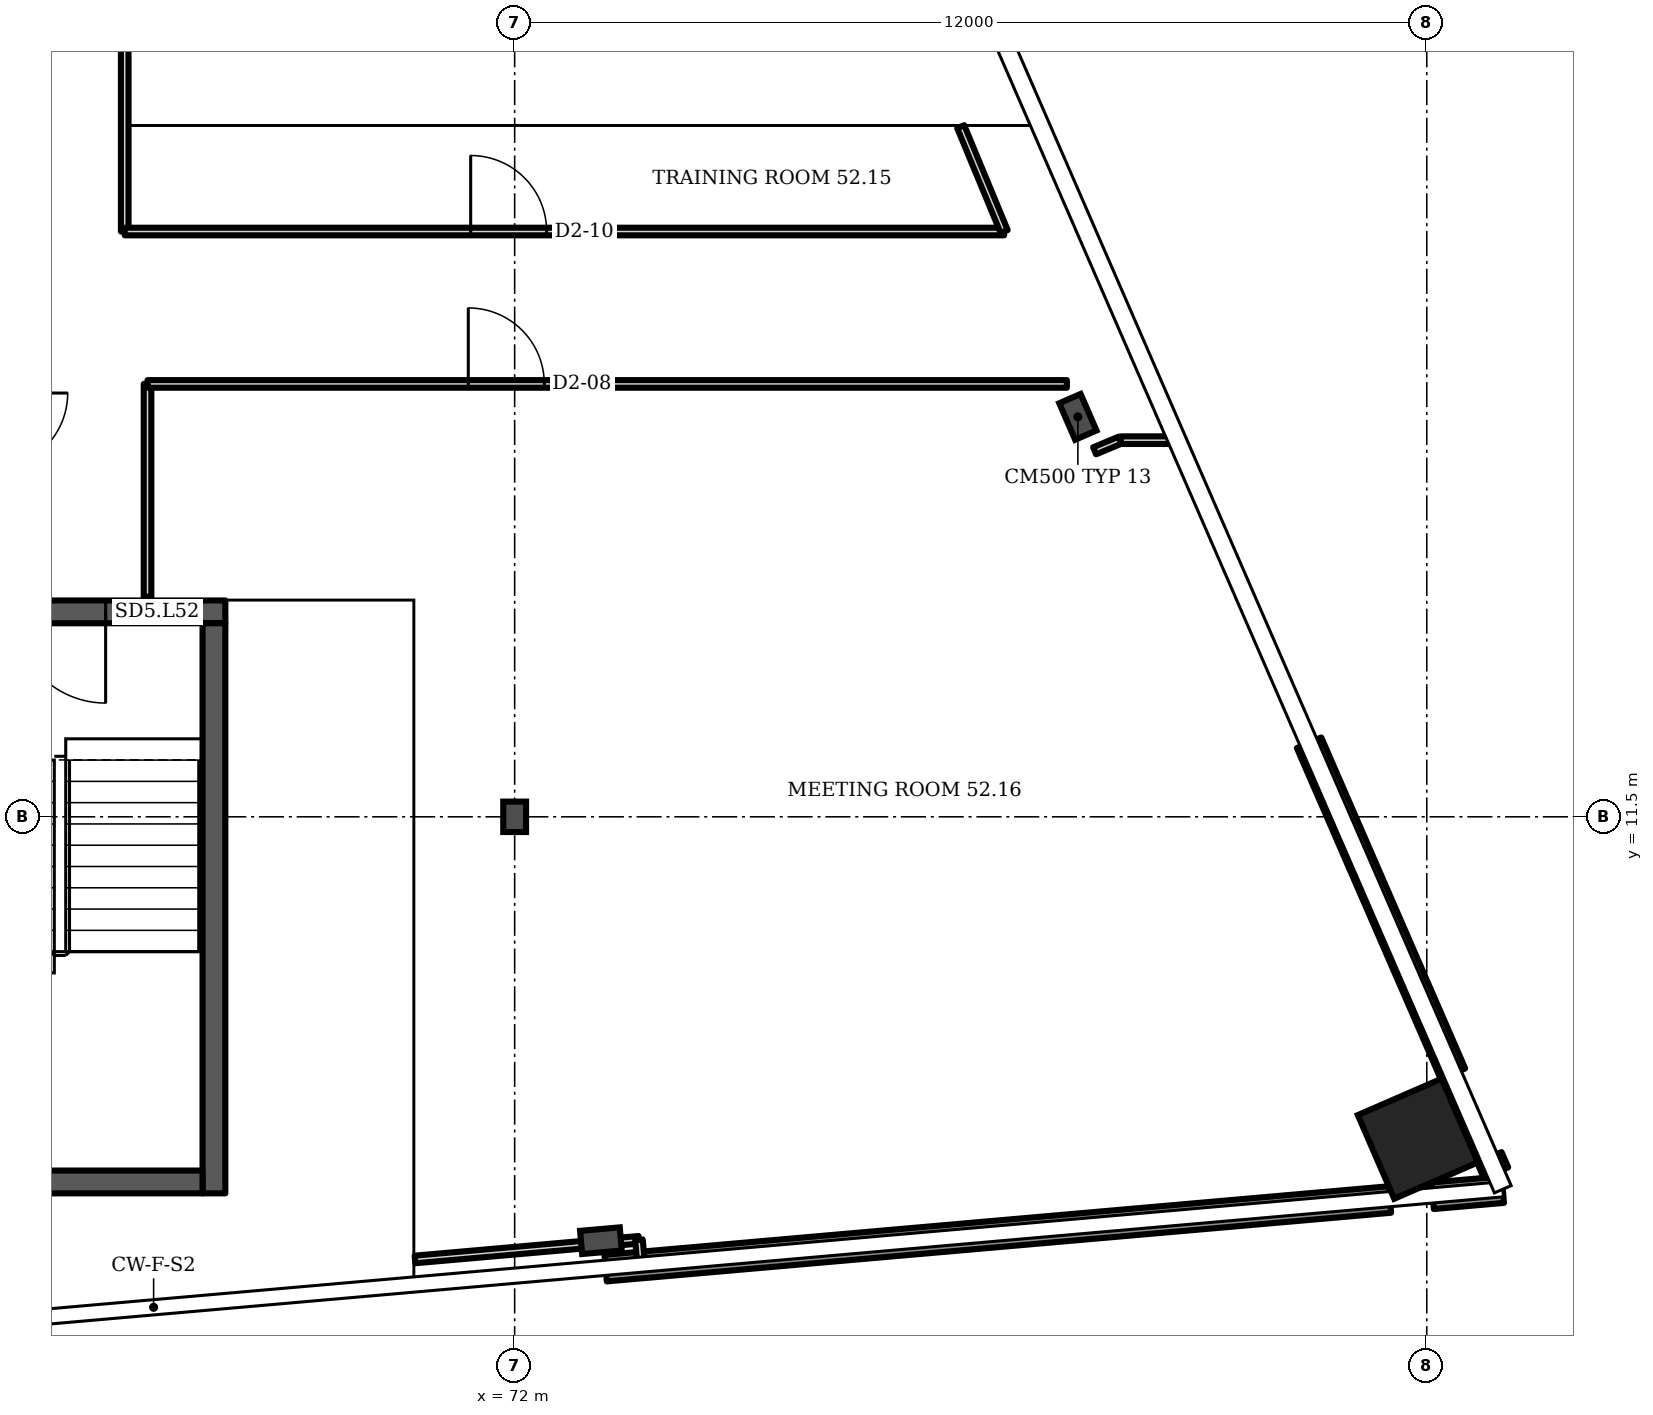
"""IFC4 building model, lengths in metres.
Left out: names, types, materials, properties, quantities, classifications, styles, units other than length and angle.
Written with IfcOpenShell. Run it as: python <this file> out.ifc"""

import sys

from ifc_helpers import new_model, si_unit, direction, frame, frame_2d, origin, origin_2d, place, context, subcontext, project, spatial, rectangle, i_section, extrude, element, fill, save


model = new_model("IFC4")
c1 = context("Model", 3, precision=1e-05, world=origin(), true_north=direction((0.0, 1.0)))
c2 = subcontext(c1, "Body", "Model", "MODEL_VIEW")
j1 = project(units=[si_unit("LENGTHUNIT", "METRE"), si_unit("PLANEANGLEUNIT", "RADIAN")], contexts=[c1])
p1 = place(None, origin())
s1 = spatial("IfcSite", under=j1, at=p1, CompositionType="ELEMENT")
p2 = place(p1, origin())
s2 = spatial("IfcBuilding", under=s1, at=p2, CompositionType="ELEMENT")
p3 = place(p2, frame((0.0, 0.0, 210.7)))
s3 = spatial("IfcBuildingStorey", under=s2, at=p3, CompositionType="ELEMENT", Elevation=210.7)
p4 = place(p3, frame((83.883, 7.265, 0.0), z_axis=(0.0, 0.0, 1.0), x_axis=(-0.398727, 0.917072, 0.0)))
e1 = element("IfcColumn", 1, at=p4, inside=s3, PredefinedType="COLUMN", context=c2, shape_type="SweptSolid", body=[
    extrude(rectangle(XDim=1.2, YDim=1.2, at=origin_2d()), origin(), (0.0, 0.0, 1.0), 3.6),
])
for number, where, z_axis, x_axis in (
    (2, (73.135, 5.923, 0.0), (0.0, 0.0, 1.0), (0.087, -0.996, 0.0)),
    (3, (79.41, 16.762, 0.0), (0.0, 0.0, 1.0), (0.917, 0.399, 0.0)),
):
    element("IfcColumn", number, at=place(p3, frame(where, z_axis=z_axis, x_axis=x_axis)), inside=s3, PredefinedType="COLUMN", context=c2, shape_type="SweptSolid", body=[
        extrude(i_section(OverallWidth=0.306, OverallDepth=0.524, WebThickness=0.021, FlangeThickness=0.04, FilletRadius=0.027, at=origin_2d()), origin(), (0.0, 0.0, 1.0), 3.6),
    ])
p5 = place(p3, frame((72.0, 11.5, 0.0), z_axis=(0.0, 0.0, 1.0), x_axis=(1.0, 0.0, 0.0)))
e4 = element("IfcColumn", 4, at=p5, inside=s3, PredefinedType="COLUMN", context=c2, shape_type="SweptSolid", body=[
    extrude(i_section(OverallWidth=0.3, OverallDepth=0.4, WebThickness=0.013, FlangeThickness=0.024, FilletRadius=0.027, at=origin_2d()), origin(), (0.0, 0.0, 1.0), 3.6),
])
p6 = place(p3, frame((73.197, 5.562, 0.0), z_axis=(0.0, 0.0, 1.0), x_axis=(0.996198, 0.087163, 0.0)))
e5 = element("IfcWall", 5, at=p6, inside=s3, PredefinedType="SOLIDWALL", context=c2, shape_type="SweptSolid", body=[
    extrude(rectangle(XDim=10.358, YDim=0.35, at=frame_2d((5.179, 0.0))), origin(), (0.0, 0.0, 1.0), 1.0),
])
p7 = place(p3, frame((84.078, 6.514, 0.0), z_axis=(0.0, 0.0, 1.0), x_axis=(0.996213, 0.086971, 0.0)))
e6 = element("IfcWall", 6, at=p7, inside=s3, PredefinedType="SOLIDWALL", context=c2, shape_type="SweptSolid", body=[
    extrude(rectangle(XDim=0.926, YDim=0.35, at=frame_2d((0.463, 0.0))), origin(), (0.0, 0.0, 1.0), 1.0),
])
p8 = place(p3, frame((84.91, 6.819, 0.0), z_axis=(0.0, 0.0, 1.0), x_axis=(-0.398359, 0.91723, 0.0)))
e7 = element("IfcWall", 7, at=p8, inside=s3, PredefinedType="SOLIDWALL", context=c2, shape_type="SweptSolid", body=[
    extrude(rectangle(XDim=0.219, YDim=0.35, at=frame_2d((0.109, 0.0))), origin(), (0.0, 0.0, 1.0), 1.0),
])
p9 = place(p3, frame((84.345, 8.12, 0.0), z_axis=(0.0, 0.0, 1.0), x_axis=(-0.398736, 0.917067, 0.0)))
e8 = element("IfcWall", 8, at=p9, inside=s3, PredefinedType="SOLIDWALL", context=c2, shape_type="SweptSolid", body=[
    extrude(rectangle(XDim=4.748, YDim=0.35, at=frame_2d((2.374, 0.0))), origin(), (0.0, 0.0, 1.0), 1.0),
])
p10 = place(p3, frame((63.844, 14.196, 0.0), z_axis=(0.0, 0.0, 1.0), x_axis=(1.0, 0.0, 0.0)))
e9 = element("IfcWall", 9, at=p10, inside=s3, PredefinedType="SHEAR", context=c2, shape_type="SweptSolid", body=[
    extrude(rectangle(XDim=4.35, YDim=0.3, at=frame_2d((2.175, 0.0))), origin(), (0.0, 0.0, 1.0), 3.2),
])
p11 = place(p10, frame((1.575, 0.0, 0.0)))
e10 = element("IfcOpeningElement", 10, at=p11, cuts=e9, PredefinedType="OPENING", context=c2, shape_type="SweptSolid", body=[
    extrude(rectangle(XDim=1.2, YDim=2.1, at=frame_2d((0.6, 1.05))), frame((0.0, 0.16, 0.0), z_axis=(0.0, -1.0, 0.0), x_axis=(1.0, 0.0, 0.0)), (0.0, 0.0, 1.0), 0.32),
])
p12 = place(p3, frame((66.87, 19.2, 0.0), z_axis=(0.0, 0.0, 1.0), x_axis=(0.0, 1.0, 0.0)))
e11 = element("IfcWall", 11, at=p12, inside=s3, PredefinedType="PARTITIONING", context=c2, shape_type="SweptSolid", body=[
    extrude(rectangle(XDim=2.575, YDim=0.1, at=frame_2d((1.288, 0.0))), origin(), (0.0, 0.0, 1.0), 3.2),
])
p13 = place(p3, frame((66.87, 19.2, 0.0), z_axis=(0.0, 0.0, 1.0), x_axis=(1.0, 0.0, 0.0)))
e12 = element("IfcWall", 12, at=p13, inside=s3, PredefinedType="PARTITIONING", context=c2, shape_type="SweptSolid", body=[
    extrude(rectangle(XDim=11.57, YDim=0.1, at=frame_2d((5.785, 0.0))), origin(), (0.0, 0.0, 1.0), 3.2),
])
p14 = place(p13, frame((4.551, 0.0, 0.0)))
e13 = element("IfcOpeningElement", 13, at=p14, cuts=e12, PredefinedType="OPENING", context=c2, shape_type="SweptSolid", body=[
    extrude(rectangle(XDim=1.0, YDim=2.1, at=frame_2d((0.5, 1.05))), frame((0.0, 0.06, 0.0), z_axis=(0.0, -1.0, 0.0), x_axis=(1.0, 0.0, 0.0)), (0.0, 0.0, 1.0), 0.12),
])
p15 = place(p3, frame((67.17, 14.395, 0.0), z_axis=(0.0, 0.0, 1.0), x_axis=(0.0, 1.0, 0.0)))
e14 = element("IfcWall", 14, at=p15, inside=s3, PredefinedType="PARTITIONING", context=c2, shape_type="SweptSolid", body=[
    extrude(rectangle(XDim=2.8, YDim=0.1, at=frame_2d((1.4, 0.0))), origin(), (0.0, 0.0, 1.0), 3.2),
])
p16 = place(p3, frame((67.17, 17.195, 0.0), z_axis=(0.0, 0.0, 1.0), x_axis=(1.0, 0.0, 0.0)))
e15 = element("IfcWall", 15, at=p16, inside=s3, PredefinedType="PARTITIONING", context=c2, shape_type="SweptSolid", body=[
    extrude(rectangle(XDim=12.095, YDim=0.1, at=frame_2d((6.047, 0.0))), origin(), (0.0, 0.0, 1.0), 3.2),
])
p17 = place(p16, frame((4.22, 0.0, 0.0)))
e16 = element("IfcOpeningElement", 16, at=p17, cuts=e15, PredefinedType="OPENING", context=c2, shape_type="SweptSolid", body=[
    extrude(rectangle(XDim=1.0, YDim=2.1, at=frame_2d((0.5, 1.05))), frame((0.0, 0.06, 0.0), z_axis=(0.0, -1.0, 0.0), x_axis=(1.0, 0.0, 0.0)), (0.0, 0.0, 1.0), 0.12),
])
p18 = place(p3, frame((70.689, 5.677, 0.0), z_axis=(0.0, 0.0, 1.0), x_axis=(0.996174, 0.087417, 0.0)))
e17 = element("IfcWall", 17, at=p18, inside=s3, PredefinedType="PARTITIONING", context=c2, shape_type="SweptSolid", body=[
    extrude(rectangle(XDim=2.958, YDim=0.1, at=frame_2d((1.479, 0.0))), origin(), (0.0, 0.0, 1.0), 2.58),
])
p19 = place(p3, frame((73.663, 5.628, 0.0), z_axis=(0.0, 0.0, 1.0), x_axis=(-0.091893, 0.995772, 0.0)))
e18 = element("IfcWall", 18, at=p19, inside=s3, PredefinedType="PARTITIONING", context=c2, shape_type="SweptSolid", body=[
    extrude(rectangle(XDim=0.308, YDim=0.1, at=frame_2d((0.154, 0.0))), origin(), (0.0, 0.0, 1.0), 3.2),
])
p20 = place(p3, frame((78.44, 19.2, 0.0), z_axis=(0.0, 0.0, 1.0), x_axis=(-0.382605, 0.923907, 0.0)))
e19 = element("IfcWall", 19, at=p20, inside=s3, PredefinedType="PARTITIONING", context=c2, shape_type="SweptSolid", body=[
    extrude(rectangle(XDim=1.494, YDim=0.1, at=frame_2d((0.747, 0.0))), origin(), (0.0, 0.0, 1.0), 3.2),
])
p21 = place(p3, frame((79.63, 16.315, 0.0), z_axis=(0.0, 0.0, 1.0), x_axis=(0.92262, 0.385713, 0.0)))
e20 = element("IfcWall", 20, at=p21, inside=s3, PredefinedType="PARTITIONING", context=c2, shape_type="SweptSolid", body=[
    extrude(rectangle(XDim=0.363, YDim=0.1, at=frame_2d((0.182, 0.0))), origin(), (0.0, 0.0, 1.0), 3.2),
])
p22 = place(p3, frame((79.975, 16.455, 0.0), z_axis=(0.0, 0.0, 1.0), x_axis=(1.0, 0.0, 0.0)))
e21 = element("IfcWall", 21, at=p22, inside=s3, PredefinedType="PARTITIONING", context=c2, shape_type="SweptSolid", body=[
    extrude(rectangle(XDim=0.718, YDim=0.1, at=frame_2d((0.359, 0.0))), origin(), (0.0, 0.0, 1.0), 3.2),
])
p23 = place(p3, frame((68.044, 6.546, 0.0), z_axis=(0.0, 0.0, 1.0), x_axis=(0.0, 1.0, 0.0)))
e22 = element("IfcWall", 22, at=p23, inside=s3, PredefinedType="SHEAR", context=c2, shape_type="SweptSolid", body=[
    extrude(rectangle(XDim=7.5, YDim=0.3, at=frame_2d((3.75, 0.0))), origin(), (0.0, 0.0, 1.0), 3.2),
])
p24 = place(p3, frame((64.144, 6.696, 0.0), z_axis=(0.0, 0.0, 1.0), x_axis=(1.0, 0.0, 0.0)))
e23 = element("IfcWall", 23, at=p24, inside=s3, PredefinedType="SHEAR", context=c2, shape_type="SweptSolid", body=[
    extrude(rectangle(XDim=3.75, YDim=0.3, at=frame_2d((1.875, 0.0))), origin(), (0.0, 0.0, 1.0), 3.2),
])
p25 = place(p11, origin())
e24 = element("IfcDoor", 24, at=p25, inside=s3, OperationType="SINGLE_SWING_RIGHT", PredefinedType="DOOR", context=c2, shape_type="SweptSolid", body=[
    extrude(rectangle(XDim=1.2, YDim=2.1, at=frame_2d((0.6, 1.05))), frame((0.0, 0.025, 0.0), z_axis=(0.0, -1.0, 0.0), x_axis=(1.0, 0.0, 0.0)), (0.0, 0.0, 1.0), 0.05),
])
fill(e10, e24)
p26 = place(p17, origin())
e25 = element("IfcDoor", 25, at=p26, inside=s3, OperationType="SINGLE_SWING_LEFT", PredefinedType="DOOR", context=c2, shape_type="SweptSolid", body=[
    extrude(rectangle(XDim=1.0, YDim=2.1, at=frame_2d((0.5, 1.05))), frame((0.0, 0.025, 0.0), z_axis=(0.0, -1.0, 0.0), x_axis=(1.0, 0.0, 0.0)), (0.0, 0.0, 1.0), 0.05),
])
fill(e16, e25)
p27 = place(p14, origin())
e26 = element("IfcDoor", 26, at=p27, inside=s3, OperationType="SINGLE_SWING_LEFT", PredefinedType="DOOR", context=c2, shape_type="SweptSolid", body=[
    extrude(rectangle(XDim=1.0, YDim=2.1, at=frame_2d((0.5, 1.05))), frame((0.0, 0.025, 0.0), z_axis=(0.0, -1.0, 0.0), x_axis=(1.0, 0.0, 0.0)), (0.0, 0.0, 1.0), 0.05),
])
fill(e13, e26)
save(model, sys.argv[1])
